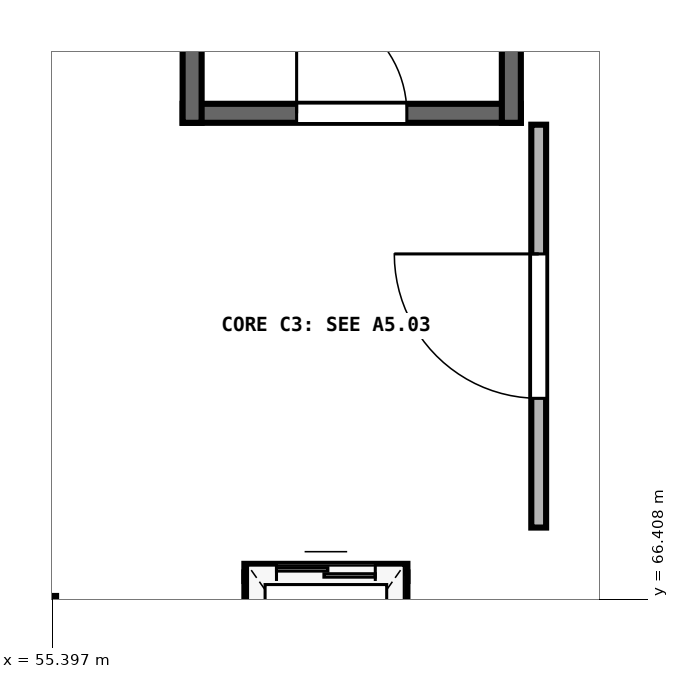
"""IFC4 building model, lengths in metres.
Left out: names, types, materials, properties, quantities, classifications, styles, units other than length and angle.
Written with IfcOpenShell. Run it as: python <this file> out.ifc"""

import sys

from ifc_helpers import new_model, si_unit, direction, frame, frame_2d, origin, origin_2d, place, context, subcontext, project, spatial, rectangle, extrude, element, fill, save


model = new_model("IFC4")
c1 = context("Model", 3, precision=1e-05, world=origin(), true_north=direction((0.0, 1.0)))
c2 = subcontext(c1, "Body", "Model", "MODEL_VIEW")
j1 = project(units=[si_unit("LENGTHUNIT", "METRE"), si_unit("PLANEANGLEUNIT", "RADIAN")], contexts=[c1])
p1 = place(None, origin())
s1 = spatial("IfcSite", under=j1, at=p1, CompositionType="ELEMENT")
p2 = place(p1, origin())
s2 = spatial("IfcBuilding", under=s1, at=p2, CompositionType="ELEMENT")
p3 = place(p2, origin())
s3 = spatial("IfcBuildingStorey", under=s2, at=p3, CompositionType="ELEMENT", Elevation=0.0)
p4 = place(p3, frame((55.0, 66.0, 0.0), z_axis=(0.0, 0.0, 1.0), x_axis=(1.0, 0.0, 0.0)))
e1 = element("IfcColumn", 1, at=p4, inside=s3, PredefinedType="COLUMN", context=c2, shape_type="SweptSolid", body=[
    extrude(rectangle(XDim=0.9, YDim=0.9, at=origin_2d()), origin(), (0.0, 0.0, 1.0), 5.12),
])
p5 = place(p3, frame((57.115, 72.8, 0.0), z_axis=(0.0, 0.0, 1.0), x_axis=(1.0, 0.0, 0.0)))
e2 = element("IfcWall", 2, at=p5, inside=s3, PredefinedType="SHEAR", context=c2, shape_type="SweptSolid", body=[
    extrude(rectangle(XDim=4.45, YDim=0.25, at=frame_2d((2.225, 0.0))), origin(), (0.0, 0.0, 1.0), 5.12),
])
p6 = place(p5, frame((1.5, 0.0, 0.0)))
e3 = element("IfcOpeningElement", 3, at=p6, cuts=e2, PredefinedType="OPENING", context=c2, shape_type="SweptSolid", body=[
    extrude(rectangle(XDim=1.45, YDim=2.2, at=frame_2d((0.725, 1.1))), frame((0.0, 0.135, 0.0), z_axis=(0.0, -1.0, 0.0), x_axis=(1.0, 0.0, 0.0)), (0.0, 0.0, 1.0), 0.27),
])
for number, where, z_axis, x_axis in (
    (4, (57.24, 72.675, 0.0), (0.0, 0.0, 1.0), (0.0, 1.0, 0.0)),
    (5, (61.44, 72.675, 0.0), (0.0, 0.0, 1.0), (0.0, 1.0, 0.0)),
):
    element("IfcWall", number, at=place(p3, frame(where, z_axis=z_axis, x_axis=x_axis)), inside=s3, PredefinedType="SHEAR", context=c2, shape_type="SweptSolid", body=[
        extrude(rectangle(XDim=11.09, YDim=0.25, at=frame_2d((5.545, 0.0))), origin(), (0.0, 0.0, 1.0), 5.12),
    ])
p7 = place(p3, frame((61.8, 67.35, 0.0), z_axis=(0.0, 0.0, 1.0), x_axis=(0.0, 1.0, 0.0)))
e6 = element("IfcWall", 6, at=p7, inside=s3, PredefinedType="PARTITIONING", context=c2, shape_type="SweptSolid", body=[
    extrude(rectangle(XDim=5.3, YDim=0.195, at=frame_2d((2.65, 0.0))), origin(), (0.0, 0.0, 1.0), 5.07),
])
p8 = place(p7, frame((1.7, 0.0, 0.0)))
e7 = element("IfcOpeningElement", 7, at=p8, cuts=e6, PredefinedType="OPENING", context=c2, shape_type="SweptSolid", body=[
    extrude(rectangle(XDim=1.9, YDim=2.3, at=frame_2d((0.95, 1.15))), frame((0.0, 0.107, 0.0), z_axis=(0.0, -1.0, 0.0), x_axis=(1.0, 0.0, 0.0)), (0.0, 0.0, 1.0), 0.215),
])
p9 = place(p3, frame((57.927, 66.76, 0.0), z_axis=(0.0, 0.0, 1.0), x_axis=(1.0, 0.0, 0.0)))
e8 = element("IfcWall", 8, at=p9, inside=s3, PredefinedType="SOLIDWALL", context=c2, shape_type="SweptSolid", body=[
    extrude(rectangle(XDim=2.145, YDim=0.225, at=frame_2d((1.073, 0.0))), origin(), (0.0, 0.0, 1.0), 5.07),
])
p10 = place(p9, frame((0.423, 0.0, 0.0)))
e9 = element("IfcOpeningElement", 9, at=p10, cuts=e8, PredefinedType="OPENING", context=c2, shape_type="SweptSolid", body=[
    extrude(rectangle(XDim=1.3, YDim=2.25, at=frame_2d((0.65, 1.125))), frame((0.0, 0.123, 0.0), z_axis=(0.0, -1.0, 0.0), x_axis=(1.0, 0.0, 0.0)), (0.0, 0.0, 1.0), 0.245),
])
for number, where, z_axis, x_axis in (
    (10, (58.04, 64.04, 0.0), (0.0, 0.0, 1.0), (0.0, 1.0, 0.0)),
    (11, (59.96, 64.04, 0.0), (0.0, 0.0, 1.0), (0.0, 1.0, 0.0)),
):
    element("IfcWall", number, at=place(p3, frame(where, z_axis=z_axis, x_axis=x_axis)), inside=s3, PredefinedType="SOLIDWALL", context=c2, shape_type="SweptSolid", body=[
        extrude(rectangle(XDim=2.72, YDim=0.225, at=frame_2d((1.36, 0.0))), origin(), (0.0, 0.0, 1.0), 5.07),
    ])
p11 = place(p6, origin())
e12 = element("IfcDoor", 12, at=p11, inside=s3, OperationType="SINGLE_SWING_LEFT", PredefinedType="DOOR", context=c2, shape_type="SweptSolid", body=[
    extrude(rectangle(XDim=1.45, YDim=2.2, at=frame_2d((0.725, 1.1))), frame((0.0, 0.025, 0.0), z_axis=(0.0, -1.0, 0.0), x_axis=(1.0, 0.0, 0.0)), (0.0, 0.0, 1.0), 0.05),
])
fill(e3, e12)
p12 = place(p8, origin())
e13 = element("IfcDoor", 13, at=p12, inside=s3, OperationType="SINGLE_SWING_RIGHT", PredefinedType="DOOR", context=c2, shape_type="SweptSolid", body=[
    extrude(rectangle(XDim=1.9, YDim=2.3, at=frame_2d((0.95, 1.15))), frame((0.0, 0.025, 0.0), z_axis=(0.0, -1.0, 0.0), x_axis=(1.0, 0.0, 0.0)), (0.0, 0.0, 1.0), 0.05),
])
fill(e7, e13)
p13 = place(p10, origin())
e14 = element("IfcDoor", 14, at=p13, inside=s3, OperationType="DOUBLE_DOOR_SLIDING", PredefinedType="DOOR", context=c2, shape_type="SweptSolid", body=[
    extrude(rectangle(XDim=1.3, YDim=2.25, at=frame_2d((0.65, 1.125))), frame((0.0, 0.025, 0.0), z_axis=(0.0, -1.0, 0.0), x_axis=(1.0, 0.0, 0.0)), (0.0, 0.0, 1.0), 0.05),
])
fill(e9, e14)
save(model, sys.argv[1])
